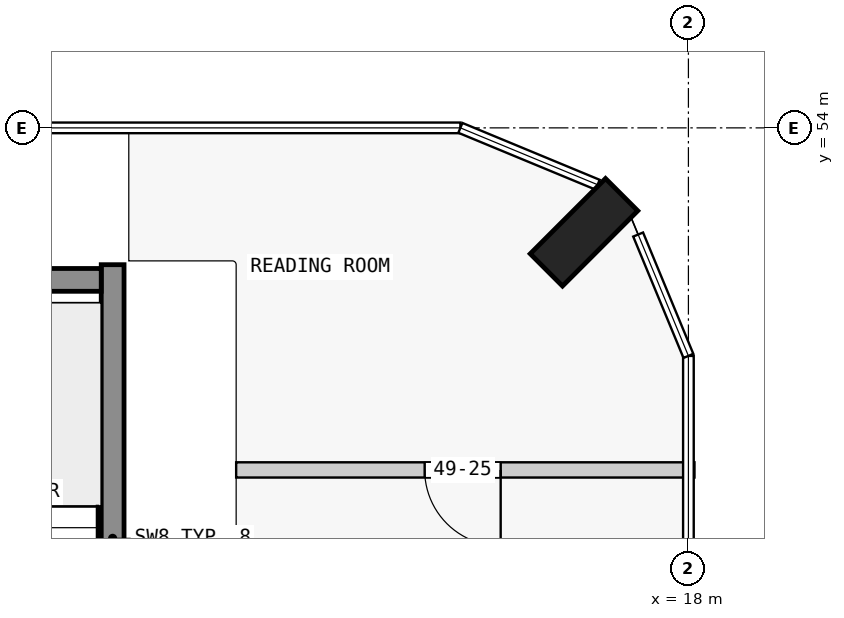
"""IFC4 building model, lengths in metres.
Left out: names, types, materials, properties, quantities, classifications, styles, units other than length and angle.
Written with IfcOpenShell. Run it as: python <this file> out.ifc"""

import sys

from ifc_helpers import new_model, si_unit, direction, frame, frame_2d, origin, origin_2d, place, context, subcontext, project, spatial, rectangle, extrude, element, fill, save


model = new_model("IFC4")
c1 = context("Model", 3, precision=1e-05, world=origin(), true_north=direction((0.0, 1.0)))
c2 = subcontext(c1, "Body", "Model", "MODEL_VIEW")
j1 = project(units=[si_unit("LENGTHUNIT", "METRE"), si_unit("PLANEANGLEUNIT", "RADIAN")], contexts=[c1])
p1 = place(None, origin())
s1 = spatial("IfcSite", under=j1, at=p1, CompositionType="ELEMENT")
p2 = place(p1, origin())
s2 = spatial("IfcBuilding", under=s1, at=p2, CompositionType="ELEMENT")
p3 = place(p2, frame((0.0, 0.0, 190.9)))
s3 = spatial("IfcBuildingStorey", under=s2, at=p3, CompositionType="ELEMENT", Elevation=190.9)
p4 = place(p3, frame((16.626, 52.626, 0.0), z_axis=(0.0, 0.0, 1.0), x_axis=(-0.707106781187, 0.707106781187, 0.0)))
e1 = element("IfcColumn", 1, at=p4, inside=s3, PredefinedType="COLUMN", context=c2, shape_type="SweptSolid", body=[
    extrude(rectangle(XDim=0.6, YDim=1.4, at=origin_2d()), origin(), (0.0, 0.0, 1.0), 3.5),
])
p5 = place(p3, frame((7.725, 52.0, 0.0), z_axis=(0.0, 0.0, 1.0), x_axis=(1.0, 0.0, 0.0)))
e2 = element("IfcWall", 2, at=p5, inside=s3, PredefinedType="SHEAR", context=c2, shape_type="SweptSolid", body=[
    extrude(rectangle(XDim=2.55, YDim=0.3, at=frame_2d((1.275, 0.0))), origin(), (0.0, 0.0, 1.0), 3.5),
])
p6 = place(p3, frame((10.425, 45.0, 0.0), z_axis=(0.0, 0.0, 1.0), x_axis=(0.0, 1.0, 0.0)))
e3 = element("IfcWall", 3, at=p6, inside=s3, PredefinedType="SHEAR", context=c2, shape_type="SweptSolid", body=[
    extrude(rectangle(XDim=7.2, YDim=0.3, at=frame_2d((3.6, 0.0))), origin(), (0.0, 0.0, 1.0), 3.5),
])
p7 = place(p3, frame((18.08, 49.5, 0.0), z_axis=(0.0, 0.0, 1.0), x_axis=(-1.0, 0.0, 0.0)))
e4 = element("IfcWall", 4, at=p7, inside=s3, PredefinedType="PARTITIONING", context=c2, shape_type="SweptSolid", body=[
    extrude(rectangle(XDim=6.03, YDim=0.2, at=frame_2d((3.015, 0.0))), origin(), (0.0, 0.0, 1.0), 3.25),
])
p8 = place(p7, frame((2.55, 0.0, 0.0)))
e5 = element("IfcOpeningElement", 5, at=p8, cuts=e4, PredefinedType="OPENING", context=c2, shape_type="SweptSolid", body=[
    extrude(rectangle(XDim=1.0, YDim=2.1, at=frame_2d((0.5, 1.05))), frame((0.0, 0.11, 0.0), z_axis=(0.0, -1.0, 0.0), x_axis=(1.0, 0.0, 0.0)), (0.0, 0.0, 1.0), 0.22),
])
p9 = place(p8, origin())
e6 = element("IfcDoor", 6, at=p9, inside=s3, OperationType="SINGLE_SWING_RIGHT", PredefinedType="DOOR", context=c2, shape_type="SweptSolid", body=[
    extrude(rectangle(XDim=1.0, YDim=2.1, at=frame_2d((0.5, 1.05))), frame((0.0, 0.025, 0.0), z_axis=(0.0, -1.0, 0.0), x_axis=(1.0, 0.0, 0.0)), (0.0, 0.0, 1.0), 0.05),
])
fill(e5, e6)
save(model, sys.argv[1])
